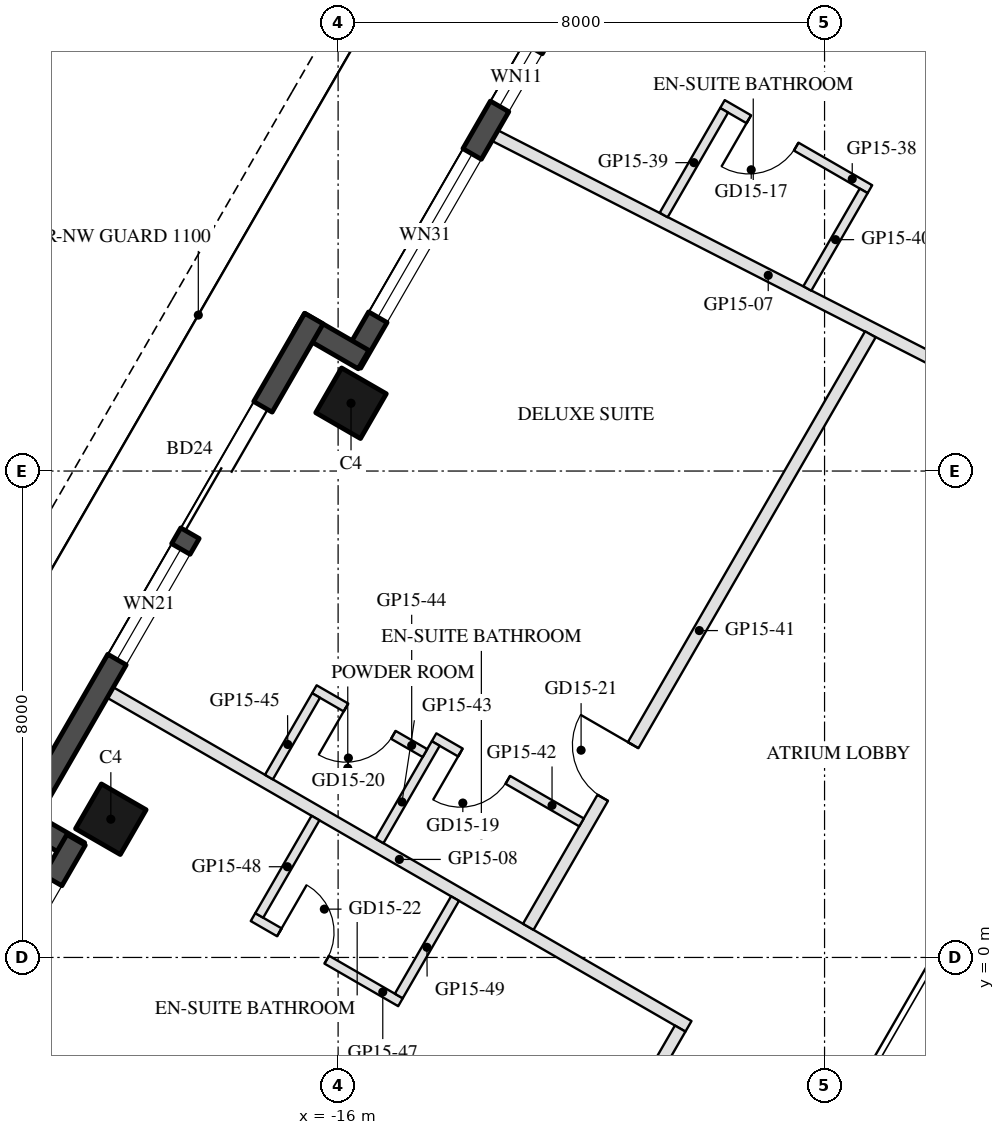
"""IFC4 building model, lengths in metres.
Left out: names, types, materials, properties, quantities, classifications, styles, units other than length and angle.
Written with IfcOpenShell. Run it as: python <this file> out.ifc"""

import sys

from ifc_helpers import new_model, si_unit, direction, frame, frame_2d, origin, origin_2d, place, context, subcontext, project, spatial, rectangle, hollow_rectangle, extrude, element, fill, save


model = new_model("IFC4")
c1 = context("Model", 3, precision=1e-05, world=origin(), true_north=direction((0.0, 1.0)))
c2 = subcontext(c1, "Body", "Model", "MODEL_VIEW")
j1 = project(units=[si_unit("LENGTHUNIT", "METRE"), si_unit("PLANEANGLEUNIT", "RADIAN")], contexts=[c1])
p1 = place(None, origin())
s1 = spatial("IfcSite", under=j1, at=p1, CompositionType="ELEMENT")
p2 = place(p1, origin())
s2 = spatial("IfcBuilding", under=s1, at=p2, CompositionType="ELEMENT")
p3 = place(p2, frame((0.0, 0.0, 168.8)))
s3 = spatial("IfcBuildingStorey", under=s2, at=p3, CompositionType="ELEMENT", Elevation=168.8)
for number, where, z_axis, x_axis in (
    (1, (-15.788, 9.115, 0.0), (0.0, 0.0, 1.0), (0.5, 0.866, 0.0)),
    (2, (-19.738, 2.273, 0.0), (0.0, 0.0, 1.0), (0.5, 0.866, 0.0)),
):
    element("IfcColumn", number, at=place(p3, frame(where, z_axis=z_axis, x_axis=x_axis)), inside=s3, PredefinedType="COLUMN", context=c2, shape_type="SweptSolid", body=[
        extrude(hollow_rectangle(XDim=0.85, YDim=0.85, WallThickness=0.04, at=origin_2d()), origin(), (0.0, 0.0, 1.0), 3.7),
    ])
p4 = place(p3, frame((-12.409, 15.617, 0.0), z_axis=(0.0, 0.0, 1.0), x_axis=(-0.500003597184, -0.866023326939, 0.0)))
e3 = element("IfcWall", 3, at=p4, inside=s3, PredefinedType="SOLIDWALL", context=c2, shape_type="SweptSolid", body=[
    extrude(rectangle(XDim=6.74, YDim=0.35, at=frame_2d((3.37, 0.0))), origin(), (0.0, 0.0, 1.0), 3.55),
])
p5 = place(p4, frame((0.77, 0.0, 0.3)))
e4 = element("IfcOpeningElement", 4, at=p5, cuts=e3, PredefinedType="OPENING", context=c2, shape_type="SweptSolid", body=[
    extrude(rectangle(XDim=1.1, YDim=2.65, at=frame_2d((0.55, 1.325))), frame((0.0, 0.185, 0.0), z_axis=(0.0, -1.0, 0.0), x_axis=(1.0, 0.0, 0.0)), (0.0, 0.0, 1.0), 0.37),
])
p6 = place(p4, frame((2.774, 0.0, 0.3)))
e5 = element("IfcOpeningElement", 5, at=p6, cuts=e3, PredefinedType="OPENING", context=c2, shape_type="SweptSolid", body=[
    extrude(rectangle(XDim=3.1, YDim=2.65, at=frame_2d((1.55, 1.325))), frame((0.0, 0.185, 0.0), z_axis=(0.0, -1.0, 0.0), x_axis=(1.0, 0.0, 0.0)), (0.0, 0.0, 1.0), 0.37),
])
p7 = place(p3, frame((-15.581, 9.833, 0.0), z_axis=(0.0, 0.0, 1.0), x_axis=(-0.866055662726, 0.499947586314, 0.0)))
e6 = element("IfcWall", 6, at=p7, inside=s3, PredefinedType="SOLIDWALL", context=c2, shape_type="SweptSolid", body=[
    extrude(rectangle(XDim=1.22, YDim=0.35, at=frame_2d((0.61, 0.0))), origin(), (0.0, 0.0, 1.0), 3.55),
])
p8 = place(p3, frame((-16.398, 10.507, 0.0), z_axis=(0.0, 0.0, 1.0), x_axis=(-0.499999142773, -0.866025898704, 0.0)))
e7 = element("IfcWall", 7, at=p8, inside=s3, PredefinedType="SOLIDWALL", context=c2, shape_type="SweptSolid", body=[
    extrude(rectangle(XDim=9.7, YDim=0.35, at=frame_2d((4.85, 0.0))), origin(), (0.0, 0.0, 1.0), 3.55),
])
p9 = place(p8, frame((1.675, 0.0, 0.0)))
e8 = element("IfcOpeningElement", 8, at=p9, cuts=e7, PredefinedType="OPENING", context=c2, shape_type="SweptSolid", body=[
    extrude(rectangle(XDim=2.4, YDim=2.4, at=frame_2d((1.2, 1.2))), frame((0.0, 0.185, 0.0), z_axis=(0.0, -1.0, 0.0), x_axis=(1.0, 0.0, 0.0)), (0.0, 0.0, 1.0), 0.37),
])
p10 = place(p8, frame((4.375, 0.0, 0.3)))
e9 = element("IfcOpeningElement", 9, at=p10, cuts=e7, PredefinedType="OPENING", context=c2, shape_type="SweptSolid", body=[
    extrude(rectangle(XDim=2.1, YDim=2.65, at=frame_2d((1.05, 1.325))), frame((0.0, 0.185, 0.0), z_axis=(0.0, -1.0, 0.0), x_axis=(1.0, 0.0, 0.0)), (0.0, 0.0, 1.0), 0.37),
])
p11 = place(p3, frame((-21.312, 2.346, 0.0), z_axis=(0.0, 0.0, 1.0), x_axis=(0.866005645448, -0.500034220881, 0.0)))
e10 = element("IfcWall", 10, at=p11, inside=s3, PredefinedType="SOLIDWALL", context=c2, shape_type="SweptSolid", body=[
    extrude(rectangle(XDim=1.22, YDim=0.35, at=frame_2d((0.61, 0.0))), origin(), (0.0, 0.0, 1.0), 3.55),
])
p12 = place(p3, frame((-20.309, 1.934, 0.0), z_axis=(0.0, 0.0, 1.0), x_axis=(-0.499992114976, -0.866029956157, 0.0)))
e11 = element("IfcWall", 11, at=p12, inside=s3, PredefinedType="SOLIDWALL", context=c2, shape_type="SweptSolid", body=[
    extrude(rectangle(XDim=6.74, YDim=0.35, at=frame_2d((3.37, 0.0))), origin(), (0.0, 0.0, 1.0), 3.55),
])
p13 = place(p12, frame((4.02, 0.0, 0.0)))
e12 = element("IfcOpeningElement", 12, at=p13, cuts=e11, PredefinedType="OPENING", context=c2, shape_type="SweptSolid", body=[
    extrude(rectangle(XDim=2.4, YDim=2.4, at=frame_2d((1.2, 1.2))), frame((0.0, 0.185, 0.0), z_axis=(0.0, -1.0, 0.0), x_axis=(1.0, 0.0, 0.0)), (0.0, 0.0, 1.0), 0.37),
])
p14 = place(p12, frame((0.77, 0.0, 0.3)))
e13 = element("IfcOpeningElement", 13, at=p14, cuts=e11, PredefinedType="OPENING", context=c2, shape_type="SweptSolid", body=[
    extrude(rectangle(XDim=2.9, YDim=2.65, at=frame_2d((1.45, 1.325))), frame((0.0, 0.185, 0.0), z_axis=(0.0, -1.0, 0.0), x_axis=(1.0, 0.0, 0.0)), (0.0, 0.0, 1.0), 0.37),
])
p15 = place(p3, frame((-13.42, 13.517, 0.0), z_axis=(0.0, 0.0, 1.0), x_axis=(0.890385665103, -0.455206950056, 0.0)))
e14 = element("IfcWall", 14, at=p15, inside=s3, PredefinedType="PARTITIONING", context=c2, shape_type="SweptSolid", body=[
    extrude(rectangle(XDim=10.093, YDim=0.2, at=frame_2d((5.047, 0.0))), origin(), (0.0, 0.0, 1.0), 3.06),
])
p16 = place(p3, frame((-19.747, 4.357, 0.0), z_axis=(0.0, 0.0, 1.0), x_axis=(0.866027479907, -0.499996404033, 0.0)))
e15 = element("IfcWall", 15, at=p16, inside=s3, PredefinedType="PARTITIONING", context=c2, shape_type="SweptSolid", body=[
    extrude(rectangle(XDim=10.98, YDim=0.2, at=frame_2d((5.49, 0.0))), origin(), (0.0, 0.0, 1.0), 3.06),
])
p17 = place(p3, frame((-7.254, 12.636, 0.0), z_axis=(0.0, 0.0, 1.0), x_axis=(-0.865996816683, 0.500049511043, 0.0)))
e16 = element("IfcWall", 16, at=p17, inside=s3, PredefinedType="PARTITIONING", context=c2, shape_type="SweptSolid", body=[
    extrude(rectangle(XDim=2.8, YDim=0.15, at=frame_2d((1.4, 0.0))), origin(), (0.0, 0.0, 1.0), 3.55),
])
p18 = place(p17, frame((1.4, 0.0, 0.0)))
e17 = element("IfcOpeningElement", 17, at=p18, cuts=e16, PredefinedType="OPENING", context=c2, shape_type="SweptSolid", body=[
    extrude(rectangle(XDim=0.9, YDim=2.1, at=frame_2d((0.45, 1.05))), frame((0.0, 0.085, 0.0), z_axis=(0.0, -1.0, 0.0), x_axis=(1.0, 0.0, 0.0)), (0.0, 0.0, 1.0), 0.17),
])
p19 = place(p3, frame((-9.651, 13.933, 0.0), z_axis=(0.0, 0.0, 1.0), x_axis=(-0.50001992892, -0.866013897511, 0.0)))
e18 = element("IfcWall", 18, at=p19, inside=s3, PredefinedType="PARTITIONING", context=c2, shape_type="SweptSolid", body=[
    extrude(rectangle(XDim=1.989, YDim=0.15, at=frame_2d((0.995, 0.0))), origin(), (0.0, 0.0, 1.0), 3.55),
])
p20 = place(p3, frame((-7.356, 12.608, 0.0), z_axis=(0.0, 0.0, 1.0), x_axis=(-0.499935264145, -0.866062775822, 0.0)))
e19 = element("IfcWall", 19, at=p20, inside=s3, PredefinedType="PARTITIONING", context=c2, shape_type="SweptSolid", body=[
    extrude(rectangle(XDim=1.854, YDim=0.15, at=frame_2d((0.927, 0.0))), origin(), (0.0, 0.0, 1.0), 3.55),
])
p21 = place(p3, frame((-12.873, 0.504, 0.0), z_axis=(0.0, 0.0, 1.0), x_axis=(0.500019832059, 0.866013953437, 0.0)))
e20 = element("IfcWall", 20, at=p21, inside=s3, PredefinedType="PARTITIONING", context=c2, shape_type="SweptSolid", body=[
    extrude(rectangle(XDim=11.252, YDim=0.2, at=frame_2d((5.626, 0.0))), origin(), (0.0, 0.0, 1.0), 2.95),
])
p22 = place(p21, frame((2.45, 0.0, 0.0)))
e21 = element("IfcOpeningElement", 21, at=p22, cuts=e20, PredefinedType="OPENING", context=c2, shape_type="SweptSolid", body=[
    extrude(rectangle(XDim=1.0, YDim=2.1, at=frame_2d((0.5, 1.05))), frame((0.0, 0.11, 0.0), z_axis=(0.0, -1.0, 0.0), x_axis=(1.0, 0.0, 0.0)), (0.0, 0.0, 1.0), 0.22),
])
p23 = place(p3, frame((-11.997, 2.221, 0.0), z_axis=(0.0, 0.0, 1.0), x_axis=(-0.866034573852, 0.49998411664, 0.0)))
e22 = element("IfcWall", 22, at=p23, inside=s3, PredefinedType="PARTITIONING", context=c2, shape_type="SweptSolid", body=[
    extrude(rectangle(XDim=2.8, YDim=0.15, at=frame_2d((1.4, 0.0))), origin(), (0.0, 0.0, 1.0), 2.95),
])
p24 = place(p23, frame((1.4, 0.0, 0.0)))
e23 = element("IfcOpeningElement", 23, at=p24, cuts=e22, PredefinedType="OPENING", context=c2, shape_type="SweptSolid", body=[
    extrude(rectangle(XDim=0.9, YDim=2.1, at=frame_2d((0.45, 1.05))), frame((0.0, 0.085, 0.0), z_axis=(0.0, -1.0, 0.0), x_axis=(1.0, 0.0, 0.0)), (0.0, 0.0, 1.0), 0.17),
])
p25 = place(p3, frame((-14.394, 3.519, 0.0), z_axis=(0.0, 0.0, 1.0), x_axis=(-0.499886193382, -0.866091100096, 0.0)))
e24 = element("IfcWall", 24, at=p25, inside=s3, PredefinedType="PARTITIONING", context=c2, shape_type="SweptSolid", body=[
    extrude(rectangle(XDim=1.85, YDim=0.15, at=frame_2d((0.925, 0.0))), origin(), (0.0, 0.0, 1.0), 3.55),
])
p26 = place(p3, frame((-14.572, 3.361, 0.0), z_axis=(0.0, 0.0, 1.0), x_axis=(-0.866009402589, 0.500027713859, 0.0)))
e25 = element("IfcWall", 25, at=p26, inside=s3, PredefinedType="PARTITIONING", context=c2, shape_type="SweptSolid", body=[
    extrude(rectangle(XDim=2.1, YDim=0.15, at=frame_2d((1.05, 0.0))), origin(), (0.0, 0.0, 1.0), 3.55),
])
p27 = place(p26, frame((0.6, 0.0, 0.0)))
e26 = element("IfcOpeningElement", 26, at=p27, cuts=e25, PredefinedType="OPENING", context=c2, shape_type="SweptSolid", body=[
    extrude(rectangle(XDim=0.9, YDim=2.1, at=frame_2d((0.45, 1.05))), frame((0.0, 0.085, 0.0), z_axis=(0.0, -1.0, 0.0), x_axis=(1.0, 0.0, 0.0)), (0.0, 0.0, 1.0), 0.17),
])
p28 = place(p3, frame((-16.363, 4.309, 0.0), z_axis=(0.0, 0.0, 1.0), x_axis=(-0.500086022567, -0.865975732936, 0.0)))
e27 = element("IfcWall", 27, at=p28, inside=s3, PredefinedType="PARTITIONING", context=c2, shape_type="SweptSolid", body=[
    extrude(rectangle(XDim=1.55, YDim=0.15, at=frame_2d((0.775, 0.0))), origin(), (0.0, 0.0, 1.0), 3.55),
])
p29 = place(p3, frame((-12.269, -4.45, 0.0), z_axis=(0.0, 0.0, 1.0), x_axis=(0.500055316652, 0.865993464345, 0.0)))
e28 = element("IfcWall", 28, at=p29, inside=s3, PredefinedType="PARTITIONING", context=c2, shape_type="SweptSolid", body=[
    extrude(rectangle(XDim=3.788, YDim=0.2, at=frame_2d((1.894, 0.0))), origin(), (0.0, 0.0, 1.0), 2.95),
])
p30 = place(p29, frame((1.394, 0.0, 0.0)))
e29 = element("IfcOpeningElement", 29, at=p30, cuts=e28, PredefinedType="OPENING", context=c2, shape_type="SweptSolid", body=[
    extrude(rectangle(XDim=1.0, YDim=2.1, at=frame_2d((0.5, 1.05))), frame((0.0, 0.11, 0.0), z_axis=(0.0, -1.0, 0.0), x_axis=(1.0, 0.0, 0.0)), (0.0, 0.0, 1.0), 0.22),
])
p31 = place(p3, frame((-17.399, 0.664, 0.0), z_axis=(0.0, 0.0, 1.0), x_axis=(0.866018616679, -0.500011755427, 0.0)))
e30 = element("IfcWall", 30, at=p31, inside=s3, PredefinedType="PARTITIONING", context=c2, shape_type="SweptSolid", body=[
    extrude(rectangle(XDim=2.8, YDim=0.15, at=frame_2d((1.4, 0.0))), origin(), (0.0, 0.0, 1.0), 3.55),
])
p32 = place(p31, frame((0.5, 0.0, 0.0)))
e31 = element("IfcOpeningElement", 31, at=p32, cuts=e30, PredefinedType="OPENING", context=c2, shape_type="SweptSolid", body=[
    extrude(rectangle(XDim=0.9, YDim=2.1, at=frame_2d((0.45, 1.05))), frame((0.0, 0.085, 0.0), z_axis=(0.0, -1.0, 0.0), x_axis=(1.0, 0.0, 0.0)), (0.0, 0.0, 1.0), 0.17),
])
p33 = place(p3, frame((-16.372, 2.293, 0.0), z_axis=(0.0, 0.0, 1.0), x_axis=(-0.499985172903, -0.866033964044, 0.0)))
e32 = element("IfcWall", 32, at=p33, inside=s3, PredefinedType="PARTITIONING", context=c2, shape_type="SweptSolid", body=[
    extrude(rectangle(XDim=1.85, YDim=0.15, at=frame_2d((0.925, 0.0))), origin(), (0.0, 0.0, 1.0), 2.95),
])
p34 = place(p3, frame((-14.077, 0.968, 0.0), z_axis=(0.0, 0.0, 1.0), x_axis=(-0.500042316284, -0.866000971088, 0.0)))
e33 = element("IfcWall", 33, at=p34, inside=s3, PredefinedType="PARTITIONING", context=c2, shape_type="SweptSolid", body=[
    extrude(rectangle(XDim=1.85, YDim=0.15, at=frame_2d((0.925, 0.0))), origin(), (0.0, 0.0, 1.0), 2.95),
])
p35 = place(p5, origin())
e34 = element("IfcWindow", 34, at=p35, inside=s3, PartitioningType="SINGLE_PANEL", PredefinedType="WINDOW", context=c2, shape_type="SweptSolid", body=[
    extrude(rectangle(XDim=1.1, YDim=2.65, at=frame_2d((0.55, 1.325))), frame((0.0, 0.03, 0.0), z_axis=(0.0, -1.0, 0.0), x_axis=(1.0, 0.0, 0.0)), (0.0, 0.0, 1.0), 0.06),
])
fill(e4, e34)
p36 = place(p6, origin())
e35 = element("IfcWindow", 35, at=p36, inside=s3, PartitioningType="SINGLE_PANEL", PredefinedType="WINDOW", context=c2, shape_type="SweptSolid", body=[
    extrude(rectangle(XDim=3.1, YDim=2.65, at=frame_2d((1.55, 1.325))), frame((0.0, 0.03, 0.0), z_axis=(0.0, -1.0, 0.0), x_axis=(1.0, 0.0, 0.0)), (0.0, 0.0, 1.0), 0.06),
])
fill(e5, e35)
p37 = place(p9, frame((2.4, 0.0, 0.0), z_axis=(0.0, 0.0, 1.0), x_axis=(-1.0, 0.0, 0.0)))
e36 = element("IfcDoor", 36, at=p37, inside=s3, OperationType="SLIDING_TO_LEFT", PredefinedType="DOOR", context=c2, shape_type="SweptSolid", body=[
    extrude(rectangle(XDim=2.4, YDim=2.4, at=frame_2d((1.2, 1.2))), frame((0.0, 0.025, 0.0), z_axis=(0.0, -1.0, 0.0), x_axis=(1.0, 0.0, 0.0)), (0.0, 0.0, 1.0), 0.05),
])
fill(e8, e36)
p38 = place(p10, origin())
e37 = element("IfcWindow", 37, at=p38, inside=s3, PartitioningType="SINGLE_PANEL", PredefinedType="WINDOW", context=c2, shape_type="SweptSolid", body=[
    extrude(rectangle(XDim=2.1, YDim=2.65, at=frame_2d((1.05, 1.325))), frame((0.0, 0.03, 0.0), z_axis=(0.0, -1.0, 0.0), x_axis=(1.0, 0.0, 0.0)), (0.0, 0.0, 1.0), 0.06),
])
fill(e9, e37)
p39 = place(p14, origin())
e38 = element("IfcWindow", 38, at=p39, inside=s3, PartitioningType="SINGLE_PANEL", PredefinedType="WINDOW", context=c2, shape_type="SweptSolid", body=[
    extrude(rectangle(XDim=2.9, YDim=2.65, at=frame_2d((1.45, 1.325))), frame((0.0, 0.03, 0.0), z_axis=(0.0, -1.0, 0.0), x_axis=(1.0, 0.0, 0.0)), (0.0, 0.0, 1.0), 0.06),
])
fill(e13, e38)
p40 = place(p18, origin())
e39 = element("IfcDoor", 39, at=p40, inside=s3, OperationType="SINGLE_SWING_RIGHT", PredefinedType="DOOR", context=c2, shape_type="SweptSolid", body=[
    extrude(rectangle(XDim=0.9, YDim=2.1, at=frame_2d((0.45, 1.05))), frame((0.0, 0.025, 0.0), z_axis=(0.0, -1.0, 0.0), x_axis=(1.0, 0.0, 0.0)), (0.0, 0.0, 1.0), 0.05),
])
fill(e17, e39)
p41 = place(p24, origin())
e40 = element("IfcDoor", 40, at=p41, inside=s3, OperationType="SINGLE_SWING_RIGHT", PredefinedType="DOOR", context=c2, shape_type="SweptSolid", body=[
    extrude(rectangle(XDim=0.9, YDim=2.1, at=frame_2d((0.45, 1.05))), frame((0.0, 0.025, 0.0), z_axis=(0.0, -1.0, 0.0), x_axis=(1.0, 0.0, 0.0)), (0.0, 0.0, 1.0), 0.05),
])
fill(e23, e40)
p42 = place(p27, origin())
e41 = element("IfcDoor", 41, at=p42, inside=s3, OperationType="SINGLE_SWING_RIGHT", PredefinedType="DOOR", context=c2, shape_type="SweptSolid", body=[
    extrude(rectangle(XDim=0.9, YDim=2.1, at=frame_2d((0.45, 1.05))), frame((0.0, 0.025, 0.0), z_axis=(0.0, -1.0, 0.0), x_axis=(1.0, 0.0, 0.0)), (0.0, 0.0, 1.0), 0.05),
])
fill(e26, e41)
p43 = place(p22, origin())
e42 = element("IfcDoor", 42, at=p43, inside=s3, OperationType="SINGLE_SWING_RIGHT", PredefinedType="DOOR", context=c2, shape_type="SweptSolid", body=[
    extrude(rectangle(XDim=1.0, YDim=2.1, at=frame_2d((0.5, 1.05))), frame((0.0, 0.025, 0.0), z_axis=(0.0, -1.0, 0.0), x_axis=(1.0, 0.0, 0.0)), (0.0, 0.0, 1.0), 0.05),
])
fill(e21, e42)
p44 = place(p32, origin())
e43 = element("IfcDoor", 43, at=p44, inside=s3, OperationType="SINGLE_SWING_LEFT", PredefinedType="DOOR", context=c2, shape_type="SweptSolid", body=[
    extrude(rectangle(XDim=0.9, YDim=2.1, at=frame_2d((0.45, 1.05))), frame((0.0, 0.025, 0.0), z_axis=(0.0, -1.0, 0.0), x_axis=(1.0, 0.0, 0.0)), (0.0, 0.0, 1.0), 0.05),
])
fill(e31, e43)
save(model, sys.argv[1])
